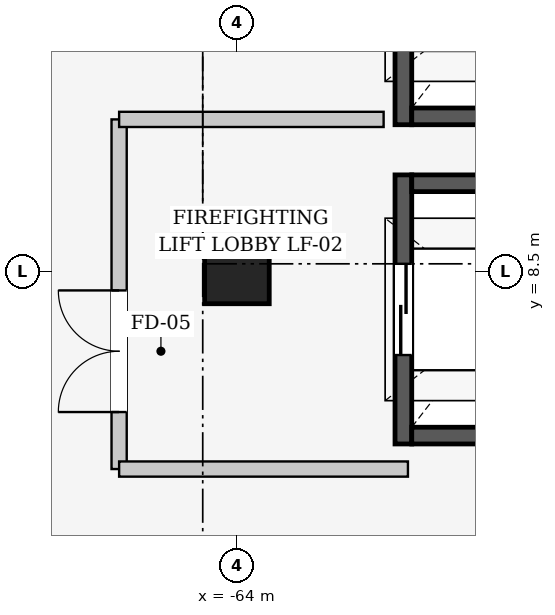
"""IFC4 building model, lengths in metres.
Left out: names, types, materials, properties, quantities, classifications, styles, units other than length and angle.
Written with IfcOpenShell. Run it as: python <this file> out.ifc"""

import sys

from ifc_helpers import new_model, si_unit, direction, frame, frame_2d, origin, origin_2d, place, context, subcontext, project, spatial, rectangle, extrude, element, fill, save


model = new_model("IFC4")
c1 = context("Model", 3, precision=1e-05, world=origin(), true_north=direction((0.0, 1.0)))
c2 = subcontext(c1, "Body", "Model", "MODEL_VIEW")
j1 = project(units=[si_unit("LENGTHUNIT", "METRE"), si_unit("PLANEANGLEUNIT", "RADIAN")], contexts=[c1])
p1 = place(None, origin())
s1 = spatial("IfcSite", under=j1, at=p1, CompositionType="ELEMENT")
p2 = place(p1, origin())
s2 = spatial("IfcBuilding", under=s1, at=p2, CompositionType="ELEMENT")
p3 = place(p2, frame((0.0, 0.0, 11.4)))
s3 = spatial("IfcBuildingStorey", under=s2, at=p3, CompositionType="ELEMENT", Elevation=11.4)
p4 = place(p3, frame((-64.0, 8.5, 0.0), z_axis=(0.0, 0.0, 1.0), x_axis=(1.0, 0.0, 0.0)))
e1 = element("IfcColumn", 1, at=p4, inside=s3, PredefinedType="COLUMN", context=c2, shape_type="SweptSolid", body=[
    extrude(rectangle(XDim=0.85, YDim=0.85, at=origin_2d()), origin(), (0.0, 0.0, 1.0), 4.8),
])
p5 = place(p3, frame((-61.81, 6.23, 0.0), z_axis=(0.0, 0.0, 1.0), x_axis=(0.0, 1.0, 0.0)))
e2 = element("IfcWall", 2, at=p5, inside=s3, PredefinedType="SHEAR", context=c2, shape_type="SweptSolid", body=[
    extrude(rectangle(XDim=3.54, YDim=0.22, at=frame_2d((1.77, 0.0))), origin(), (0.0, 0.0, 1.0), 4.8),
])
p6 = place(p5, frame((1.17, 0.0, 0.0)))
e3 = element("IfcOpeningElement", 3, at=p6, cuts=e2, PredefinedType="OPENING", context=c2, shape_type="SweptSolid", body=[
    extrude(rectangle(XDim=1.2, YDim=2.2, at=frame_2d((0.6, 1.1))), frame((0.0, 0.12, 0.0), z_axis=(0.0, -1.0, 0.0), x_axis=(1.0, 0.0, 0.0)), (0.0, 0.0, 1.0), 0.24),
])
for number, where, z_axis, x_axis in (
    (4, (-61.7, 9.66, 0.0), (0.0, 0.0, 1.0), (1.0, 0.0, 0.0)),
    (5, (-59.3, 6.34, 0.0), (0.0, 0.0, 1.0), (-1.0, 0.0, 0.0)),
):
    element("IfcWall", number, at=place(p3, frame(where, z_axis=z_axis, x_axis=x_axis)), inside=s3, PredefinedType="SHEAR", context=c2, shape_type="SweptSolid", body=[
        extrude(rectangle(XDim=2.4, YDim=0.22, at=frame_2d((1.2, 0.0))), origin(), (0.0, 0.0, 1.0), 4.8),
    ])
p7 = place(p3, frame((-61.81, 10.43, 0.0), z_axis=(0.0, 0.0, 1.0), x_axis=(0.0, 1.0, 0.0)))
e6 = element("IfcWall", 6, at=p7, inside=s3, PredefinedType="SHEAR", context=c2, shape_type="SweptSolid", body=[
    extrude(rectangle(XDim=3.54, YDim=0.22, at=frame_2d((1.77, 0.0))), origin(), (0.0, 0.0, 1.0), 4.8),
])
p8 = place(p7, frame((1.22, 0.0, 0.0)))
e7 = element("IfcOpeningElement", 7, at=p8, cuts=e6, PredefinedType="OPENING", context=c2, shape_type="SweptSolid", body=[
    extrude(rectangle(XDim=1.1, YDim=2.2, at=frame_2d((0.55, 1.1))), frame((0.0, 0.12, 0.0), z_axis=(0.0, -1.0, 0.0), x_axis=(1.0, 0.0, 0.0)), (0.0, 0.0, 1.0), 0.24),
])
p9 = place(p3, frame((-59.3, 10.54, 0.0), z_axis=(0.0, 0.0, 1.0), x_axis=(-1.0, 0.0, 0.0)))
e8 = element("IfcWall", 8, at=p9, inside=s3, PredefinedType="SHEAR", context=c2, shape_type="SweptSolid", body=[
    extrude(rectangle(XDim=2.4, YDim=0.22, at=frame_2d((1.2, 0.0))), origin(), (0.0, 0.0, 1.0), 4.8),
])
p10 = place(p3, frame((-65.55, 5.9, 0.0), z_axis=(0.0, 0.0, 1.0), x_axis=(0.0, 1.0, 0.0)))
e9 = element("IfcWall", 9, at=p10, inside=s3, PredefinedType="PARTITIONING", context=c2, shape_type="SweptSolid", body=[
    extrude(rectangle(XDim=4.6, YDim=0.2, at=frame_2d((2.3, 0.0))), origin(), (0.0, 0.0, 1.0), 3.545),
])
p11 = place(p10, frame((0.75, 0.0, 0.0)))
e10 = element("IfcOpeningElement", 10, at=p11, cuts=e9, PredefinedType="OPENING", context=c2, shape_type="SweptSolid", body=[
    extrude(rectangle(XDim=1.6, YDim=2.2, at=frame_2d((0.8, 1.1))), frame((0.0, 0.11, 0.0), z_axis=(0.0, -1.0, 0.0), x_axis=(1.0, 0.0, 0.0)), (0.0, 0.0, 1.0), 0.22),
])
p12 = place(p3, frame((-65.55, 10.5, 0.0), z_axis=(0.0, 0.0, 1.0), x_axis=(1.0, 0.0, 0.0)))
e11 = element("IfcWall", 11, at=p12, inside=s3, PredefinedType="PARTITIONING", context=c2, shape_type="SweptSolid", body=[
    extrude(rectangle(XDim=3.48, YDim=0.2, at=frame_2d((1.74, 0.0))), origin(), (0.0, 0.0, 1.0), 3.845),
])
p13 = place(p3, frame((-61.75, 5.9, 0.0), z_axis=(0.0, 0.0, 1.0), x_axis=(-1.0, 0.0, 0.0)))
e12 = element("IfcWall", 12, at=p13, inside=s3, PredefinedType="PARTITIONING", context=c2, shape_type="SweptSolid", body=[
    extrude(rectangle(XDim=3.8, YDim=0.2, at=frame_2d((1.9, 0.0))), origin(), (0.0, 0.0, 1.0), 3.845),
])
p14 = place(p6, origin())
e13 = element("IfcDoor", 13, at=p14, inside=s3, OperationType="SLIDING_TO_LEFT", PredefinedType="DOOR", context=c2, shape_type="SweptSolid", body=[
    extrude(rectangle(XDim=1.2, YDim=2.2, at=frame_2d((0.6, 1.1))), frame((0.0, 0.025, 0.0), z_axis=(0.0, -1.0, 0.0), x_axis=(1.0, 0.0, 0.0)), (0.0, 0.0, 1.0), 0.05),
])
fill(e3, e13)
p15 = place(p11, origin())
e14 = element("IfcDoor", 14, at=p15, inside=s3, OperationType="DOUBLE_DOOR_SINGLE_SWING", PredefinedType="DOOR", context=c2, shape_type="SweptSolid", body=[
    extrude(rectangle(XDim=1.6, YDim=2.2, at=frame_2d((0.8, 1.1))), frame((0.0, 0.025, 0.0), z_axis=(0.0, -1.0, 0.0), x_axis=(1.0, 0.0, 0.0)), (0.0, 0.0, 1.0), 0.05),
])
fill(e10, e14)
save(model, sys.argv[1])
